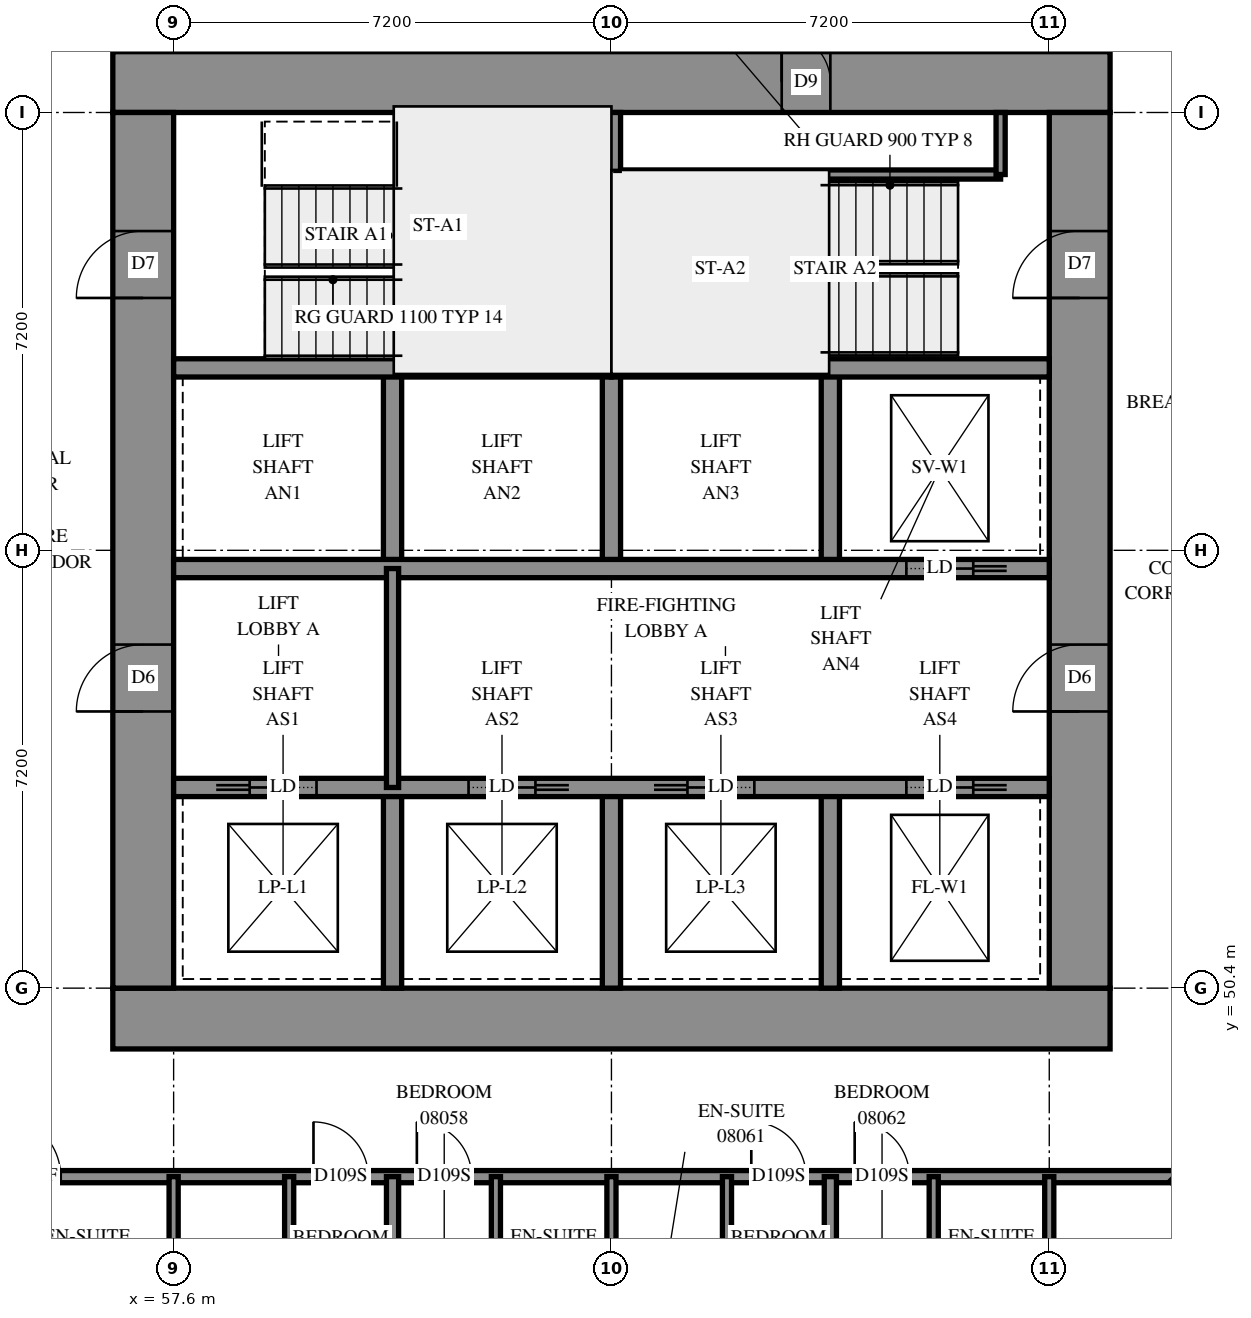
"""IFC4 building model, lengths in metres.
Left out: names, types, materials, properties, quantities, classifications, styles, units other than length and angle.
Written with IfcOpenShell. Run it as: python <this file> out.ifc"""

import sys

from ifc_helpers import new_model, si_unit, direction, frame, frame_2d, origin, place, context, subcontext, project, spatial, rectangle, extrude, element, fill, save


model = new_model("IFC4")
c1 = context("Model", 3, precision=1e-05, world=origin(), true_north=direction((0.0, 1.0)))
c2 = subcontext(c1, "Body", "Model", "MODEL_VIEW")
j1 = project(units=[si_unit("LENGTHUNIT", "METRE"), si_unit("PLANEANGLEUNIT", "RADIAN")], contexts=[c1])
p1 = place(None, origin())
s1 = spatial("IfcSite", under=j1, at=p1, CompositionType="ELEMENT")
p2 = place(p1, origin())
s2 = spatial("IfcBuilding", under=s1, at=p2, CompositionType="ELEMENT")
p3 = place(p2, frame((0.0, 0.0, 33.8)))
s3 = spatial("IfcBuildingStorey", under=s2, at=p3, CompositionType="ELEMENT", Elevation=33.8)
p4 = place(p3, frame((56.6, 49.9, -0.3), z_axis=(0.0, 0.0, 1.0), x_axis=(1.0, 0.0, 0.0)))
e1 = element("IfcWall", 1, at=p4, inside=s3, PredefinedType="SHEAR", context=c2, shape_type="SweptSolid", body=[
    extrude(rectangle(XDim=16.4, YDim=1.0, at=frame_2d((8.2, 0.0))), origin(), (0.0, 0.0, 1.0), 2.7),
])
p5 = place(p3, frame((56.6, 65.3, -0.3), z_axis=(0.0, 0.0, 1.0), x_axis=(1.0, 0.0, 0.0)))
e2 = element("IfcWall", 2, at=p5, inside=s3, PredefinedType="SHEAR", context=c2, shape_type="SweptSolid", body=[
    extrude(rectangle(XDim=16.4, YDim=1.0, at=frame_2d((8.2, 0.0))), origin(), (0.0, 0.0, 1.0), 2.7),
])
p6 = place(p5, frame((11.0, 0.0, 0.3)))
e3 = element("IfcOpeningElement", 3, at=p6, cuts=e2, PredefinedType="OPENING", context=c2, shape_type="SweptSolid", body=[
    extrude(rectangle(XDim=0.8, YDim=2.1, at=frame_2d((0.4, 1.05))), frame((0.0, 0.51, 0.0), z_axis=(0.0, -1.0, 0.0), x_axis=(1.0, 0.0, 0.0)), (0.0, 0.0, 1.0), 1.02),
])
p7 = place(p3, frame((57.1, 50.4, -0.3), z_axis=(0.0, 0.0, 1.0), x_axis=(0.0, 1.0, 0.0)))
e4 = element("IfcWall", 4, at=p7, inside=s3, PredefinedType="SHEAR", context=c2, shape_type="SweptSolid", body=[
    extrude(rectangle(XDim=14.4, YDim=1.0, at=frame_2d((7.2, 0.0))), origin(), (0.0, 0.0, 1.0), 2.7),
])
p8 = place(p7, frame((4.55, 0.0, 0.3)))
e5 = element("IfcOpeningElement", 5, at=p8, cuts=e4, PredefinedType="OPENING", context=c2, shape_type="SweptSolid", body=[
    extrude(rectangle(XDim=1.1, YDim=2.1, at=frame_2d((0.55, 1.05))), frame((0.0, 0.51, 0.0), z_axis=(0.0, -1.0, 0.0), x_axis=(1.0, 0.0, 0.0)), (0.0, 0.0, 1.0), 1.02),
])
p9 = place(p7, frame((11.35, 0.0, 0.3)))
e6 = element("IfcOpeningElement", 6, at=p9, cuts=e4, PredefinedType="OPENING", context=c2, shape_type="SweptSolid", body=[
    extrude(rectangle(XDim=1.1, YDim=2.1, at=frame_2d((0.55, 1.05))), frame((0.0, 0.51, 0.0), z_axis=(0.0, -1.0, 0.0), x_axis=(1.0, 0.0, 0.0)), (0.0, 0.0, 1.0), 1.02),
])
p10 = place(p3, frame((72.5, 50.4, -0.3), z_axis=(0.0, 0.0, 1.0), x_axis=(0.0, 1.0, 0.0)))
e7 = element("IfcWall", 7, at=p10, inside=s3, PredefinedType="SHEAR", context=c2, shape_type="SweptSolid", body=[
    extrude(rectangle(XDim=14.4, YDim=1.0, at=frame_2d((7.2, 0.0))), origin(), (0.0, 0.0, 1.0), 2.7),
])
p11 = place(p10, frame((4.55, 0.0, 0.3)))
e8 = element("IfcOpeningElement", 8, at=p11, cuts=e7, PredefinedType="OPENING", context=c2, shape_type="SweptSolid", body=[
    extrude(rectangle(XDim=1.1, YDim=2.1, at=frame_2d((0.55, 1.05))), frame((0.0, 0.51, 0.0), z_axis=(0.0, -1.0, 0.0), x_axis=(1.0, 0.0, 0.0)), (0.0, 0.0, 1.0), 1.02),
])
p12 = place(p10, frame((11.35, 0.0, 0.3)))
e9 = element("IfcOpeningElement", 9, at=p12, cuts=e7, PredefinedType="OPENING", context=c2, shape_type="SweptSolid", body=[
    extrude(rectangle(XDim=1.1, YDim=2.1, at=frame_2d((0.55, 1.05))), frame((0.0, 0.51, 0.0), z_axis=(0.0, -1.0, 0.0), x_axis=(1.0, 0.0, 0.0)), (0.0, 0.0, 1.0), 1.02),
])
for number, where, z_axis, x_axis in (
    (10, (61.2, 50.4, 0.0), (0.0, 0.0, 1.0), (0.0, 1.0, 0.0)),
    (11, (61.2, 57.3, 0.0), (0.0, 0.0, 1.0), (0.0, 1.0, 0.0)),
    (12, (64.8, 50.4, 0.0), (0.0, 0.0, 1.0), (0.0, 1.0, 0.0)),
    (13, (64.8, 57.3, 0.0), (0.0, 0.0, 1.0), (0.0, 1.0, 0.0)),
    (14, (68.4, 50.4, 0.0), (0.0, 0.0, 1.0), (0.0, 1.0, 0.0)),
    (15, (68.4, 57.3, 0.0), (0.0, 0.0, 1.0), (0.0, 1.0, 0.0)),
):
    element("IfcWall", number, at=place(p3, frame(where, z_axis=z_axis, x_axis=x_axis)), inside=s3, PredefinedType="SOLIDWALL", context=c2, shape_type="SweptSolid", body=[
        extrude(rectangle(XDim=3.3, YDim=0.3, at=frame_2d((1.65, 0.0))), origin(), (0.0, 0.0, 1.0), 3.1),
    ])
p13 = place(p3, frame((57.6, 53.7, 0.0), z_axis=(0.0, 0.0, 1.0), x_axis=(1.0, 0.0, 0.0)))
e16 = element("IfcWall", 16, at=p13, inside=s3, PredefinedType="SOLIDWALL", context=c2, shape_type="SweptSolid", body=[
    extrude(rectangle(XDim=14.4, YDim=0.3, at=frame_2d((7.2, 0.0))), origin(), (0.0, 0.0, 1.0), 3.1),
])
p14 = place(p13, frame((1.25, 0.0, 0.0)))
e17 = element("IfcOpeningElement", 17, at=p14, cuts=e16, PredefinedType="OPENING", context=c2, shape_type="SweptSolid", body=[
    extrude(rectangle(XDim=1.1, YDim=2.1, at=frame_2d((0.55, 1.05))), frame((0.0, 0.16, 0.0), z_axis=(0.0, -1.0, 0.0), x_axis=(1.0, 0.0, 0.0)), (0.0, 0.0, 1.0), 0.32),
])
p15 = place(p13, frame((4.85, 0.0, 0.0)))
e18 = element("IfcOpeningElement", 18, at=p15, cuts=e16, PredefinedType="OPENING", context=c2, shape_type="SweptSolid", body=[
    extrude(rectangle(XDim=1.1, YDim=2.1, at=frame_2d((0.55, 1.05))), frame((0.0, 0.16, 0.0), z_axis=(0.0, -1.0, 0.0), x_axis=(1.0, 0.0, 0.0)), (0.0, 0.0, 1.0), 0.32),
])
p16 = place(p13, frame((8.45, 0.0, 0.0)))
e19 = element("IfcOpeningElement", 19, at=p16, cuts=e16, PredefinedType="OPENING", context=c2, shape_type="SweptSolid", body=[
    extrude(rectangle(XDim=1.1, YDim=2.1, at=frame_2d((0.55, 1.05))), frame((0.0, 0.16, 0.0), z_axis=(0.0, -1.0, 0.0), x_axis=(1.0, 0.0, 0.0)), (0.0, 0.0, 1.0), 0.32),
])
p17 = place(p13, frame((12.05, 0.0, 0.0)))
e20 = element("IfcOpeningElement", 20, at=p17, cuts=e16, PredefinedType="OPENING", context=c2, shape_type="SweptSolid", body=[
    extrude(rectangle(XDim=1.1, YDim=2.1, at=frame_2d((0.55, 1.05))), frame((0.0, 0.16, 0.0), z_axis=(0.0, -1.0, 0.0), x_axis=(1.0, 0.0, 0.0)), (0.0, 0.0, 1.0), 0.32),
])
p18 = place(p3, frame((57.6, 57.3, 0.0), z_axis=(0.0, 0.0, 1.0), x_axis=(1.0, 0.0, 0.0)))
e21 = element("IfcWall", 21, at=p18, inside=s3, PredefinedType="SOLIDWALL", context=c2, shape_type="SweptSolid", body=[
    extrude(rectangle(XDim=14.4, YDim=0.3, at=frame_2d((7.2, 0.0))), origin(), (0.0, 0.0, 1.0), 3.1),
])
p19 = place(p18, frame((12.05, 0.0, 0.0)))
e22 = element("IfcOpeningElement", 22, at=p19, cuts=e21, PredefinedType="OPENING", context=c2, shape_type="SweptSolid", body=[
    extrude(rectangle(XDim=1.1, YDim=2.1, at=frame_2d((0.55, 1.05))), frame((0.0, 0.16, 0.0), z_axis=(0.0, -1.0, 0.0), x_axis=(1.0, 0.0, 0.0)), (0.0, 0.0, 1.0), 0.32),
])
for number, where, z_axis, x_axis in (
    (23, (57.6, 60.6, 0.0), (0.0, 0.0, 1.0), (1.0, 0.0, 0.0)),
    (24, (64.8, 60.6, 0.0), (0.0, 0.0, 1.0), (1.0, 0.0, 0.0)),
):
    element("IfcWall", number, at=place(p3, frame(where, z_axis=z_axis, x_axis=x_axis)), inside=s3, PredefinedType="SOLIDWALL", context=c2, shape_type="SweptSolid", body=[
        extrude(rectangle(XDim=7.2, YDim=0.3, at=frame_2d((3.6, 0.0))), origin(), (0.0, 0.0, 1.0), 3.1),
    ])
p20 = place(p3, frame((64.8, 60.6, 0.0), z_axis=(0.0, 0.0, 1.0), x_axis=(0.0, 1.0, 0.0)))
e25 = element("IfcWall", 25, at=p20, inside=s3, PredefinedType="SOLIDWALL", context=c2, shape_type="SweptSolid", body=[
    extrude(rectangle(XDim=4.2, YDim=0.3, at=frame_2d((2.1, 0.0))), origin(), (0.0, 0.0, 1.0), 3.1),
])
p21 = place(p3, frame((64.95, 63.78, 0.0), z_axis=(0.0, 0.0, 1.0), x_axis=(1.0, 0.0, 0.0)))
e26 = element("IfcWall", 26, at=p21, inside=s3, PredefinedType="PARTITIONING", context=c2, shape_type="SweptSolid", body=[
    extrude(rectangle(XDim=6.25, YDim=0.15, at=frame_2d((3.125, 0.0))), origin(), (0.0, 0.0, 1.0), 3.1),
])
p22 = place(p3, frame((71.2, 63.78, 0.0), z_axis=(0.0, 0.0, 1.0), x_axis=(0.0, 1.0, 0.0)))
e27 = element("IfcWall", 27, at=p22, inside=s3, PredefinedType="PARTITIONING", context=c2, shape_type="SweptSolid", body=[
    extrude(rectangle(XDim=1.02, YDim=0.15, at=frame_2d((0.51, 0.0))), origin(), (0.0, 0.0, 1.0), 3.1),
])
p23 = place(p3, frame((61.2, 53.7, 0.0), z_axis=(0.0, 0.0, 1.0), x_axis=(0.0, 1.0, 0.0)))
e28 = element("IfcWall", 28, at=p23, inside=s3, PredefinedType="PARTITIONING", context=c2, shape_type="SweptSolid", body=[
    extrude(rectangle(XDim=3.6, YDim=0.2, at=frame_2d((1.8, 0.0))), origin(), (0.0, 0.0, 1.0), 3.1),
])
p24 = place(p3, frame((54.5, 47.3, 0.0), z_axis=(0.0, 0.0, 1.0), x_axis=(1.0, 0.0, 0.0)))
e29 = element("IfcWall", 29, at=p24, inside=s3, PredefinedType="PARTITIONING", context=c2, shape_type="SweptSolid", body=[
    extrude(rectangle(XDim=19.56, YDim=0.2, at=frame_2d((9.78, 0.0))), origin(), (0.0, 0.0, 1.0), 3.1),
])
p25 = place(p24, frame((0.243, 0.0, 0.0)))
e30 = element("IfcOpeningElement", 30, at=p25, cuts=e29, PredefinedType="OPENING", context=c2, shape_type="SweptSolid", body=[
    extrude(rectangle(XDim=1.0, YDim=2.1, at=frame_2d((0.5, 1.05))), frame((0.0, 0.11, 0.0), z_axis=(0.0, -1.0, 0.0), x_axis=(1.0, 0.0, 0.0)), (0.0, 0.0, 1.0), 0.22),
])
p26 = place(p24, frame((5.4, 0.0, 0.0)))
e31 = element("IfcOpeningElement", 31, at=p26, cuts=e29, PredefinedType="OPENING", context=c2, shape_type="SweptSolid", body=[
    extrude(rectangle(XDim=0.9, YDim=2.1, at=frame_2d((0.45, 1.05))), frame((0.0, 0.11, 0.0), z_axis=(0.0, -1.0, 0.0), x_axis=(1.0, 0.0, 0.0)), (0.0, 0.0, 1.0), 0.22),
])
p27 = place(p24, frame((7.1, 0.0, 0.0)))
e32 = element("IfcOpeningElement", 32, at=p27, cuts=e29, PredefinedType="OPENING", context=c2, shape_type="SweptSolid", body=[
    extrude(rectangle(XDim=0.9, YDim=2.1, at=frame_2d((0.45, 1.05))), frame((0.0, 0.11, 0.0), z_axis=(0.0, -1.0, 0.0), x_axis=(1.0, 0.0, 0.0)), (0.0, 0.0, 1.0), 0.22),
])
p28 = place(p24, frame((12.6, 0.0, 0.0)))
e33 = element("IfcOpeningElement", 33, at=p28, cuts=e29, PredefinedType="OPENING", context=c2, shape_type="SweptSolid", body=[
    extrude(rectangle(XDim=0.9, YDim=2.1, at=frame_2d((0.45, 1.05))), frame((0.0, 0.11, 0.0), z_axis=(0.0, -1.0, 0.0), x_axis=(1.0, 0.0, 0.0)), (0.0, 0.0, 1.0), 0.22),
])
p29 = place(p24, frame((14.3, 0.0, 0.0)))
e34 = element("IfcOpeningElement", 34, at=p29, cuts=e29, PredefinedType="OPENING", context=c2, shape_type="SweptSolid", body=[
    extrude(rectangle(XDim=0.9, YDim=2.1, at=frame_2d((0.45, 1.05))), frame((0.0, 0.11, 0.0), z_axis=(0.0, -1.0, 0.0), x_axis=(1.0, 0.0, 0.0)), (0.0, 0.0, 1.0), 0.22),
])
p30 = place(p3, frame((68.4, 42.331, 0.0), z_axis=(0.0, 0.0, 1.0), x_axis=(0.0, 1.0, 0.0)))
e35 = element("IfcWall", 35, at=p30, inside=s3, PredefinedType="PARTITIONING", context=c2, shape_type="SweptSolid", body=[
    extrude(rectangle(XDim=4.969, YDim=0.2, at=frame_2d((2.484, 0.0))), origin(), (0.0, 0.0, 1.0), 3.1),
])
p31 = place(p3, frame((61.2, 42.369, 0.0), z_axis=(0.0, 0.0, 1.0), x_axis=(0.0, 1.0, 0.0)))
e36 = element("IfcWall", 36, at=p31, inside=s3, PredefinedType="PARTITIONING", context=c2, shape_type="SweptSolid", body=[
    extrude(rectangle(XDim=4.931, YDim=0.2, at=frame_2d((2.465, 0.0))), origin(), (0.0, 0.0, 1.0), 3.1),
])
p32 = place(p3, frame((74.057, 47.297, 0.0), z_axis=(0.0, 0.0, 1.0), x_axis=(0.7071067812, -0.7071067812, 0.0)))
e37 = element("IfcWall", 37, at=p32, inside=s3, PredefinedType="PARTITIONING", context=c2, shape_type="SweptSolid", body=[
    extrude(rectangle(XDim=4.653, YDim=0.2, at=frame_2d((2.326, 0.0))), origin(), (0.0, 0.0, 1.0), 3.1),
])
p33 = place(p32, frame((0.57, 0.0, 0.0)))
e38 = element("IfcOpeningElement", 38, at=p33, cuts=e37, PredefinedType="OPENING", context=c2, shape_type="SweptSolid", body=[
    extrude(rectangle(XDim=1.0, YDim=2.1, at=frame_2d((0.5, 1.05))), frame((0.0, 0.11, 0.0), z_axis=(0.0, -1.0, 0.0), x_axis=(1.0, 0.0, 0.0)), (0.0, 0.0, 1.0), 0.22),
])
for number, where, z_axis, x_axis in (
    (39, (59.5, 44.9, 0.0), (0.0, 0.0, 1.0), (0.0, 1.0, 0.0)),
    (40, (57.6, 44.9, 0.0), (0.0, 0.0, 1.0), (0.0, 1.0, 0.0)),
    (41, (62.9, 44.9, 0.0), (0.0, 0.0, 1.0), (0.0, 1.0, 0.0)),
    (42, (66.7, 44.9, 0.0), (0.0, 0.0, 1.0), (0.0, 1.0, 0.0)),
    (43, (64.8, 44.9, 0.0), (0.0, 0.0, 1.0), (0.0, 1.0, 0.0)),
    (44, (70.1, 44.9, 0.0), (0.0, 0.0, 1.0), (0.0, 1.0, 0.0)),
    (45, (72.0, 44.9, 0.0), (0.0, 0.0, 1.0), (0.0, 1.0, 0.0)),
):
    element("IfcWall", number, at=place(p3, frame(where, z_axis=z_axis, x_axis=x_axis)), inside=s3, PredefinedType="PARTITIONING", context=c2, shape_type="SweptSolid", body=[
        extrude(rectangle(XDim=2.4, YDim=0.15, at=frame_2d((1.2, 0.0))), origin(), (0.0, 0.0, 1.0), 3.1),
    ])
p34 = place(p6, origin())
e46 = element("IfcDoor", 46, at=p34, inside=s3, OperationType="SINGLE_SWING_RIGHT", PredefinedType="DOOR", context=c2, shape_type="SweptSolid", body=[
    extrude(rectangle(XDim=0.8, YDim=2.1, at=frame_2d((0.4, 1.05))), frame((0.0, -0.44, 0.0), z_axis=(0.0, -1.0, 0.0), x_axis=(1.0, 0.0, 0.0)), (0.0, 0.0, 1.0), 0.05),
])
fill(e3, e46)
p35 = place(p8, origin())
e47 = element("IfcDoor", 47, at=p35, inside=s3, OperationType="DOUBLE_DOOR_SINGLE_SWING", PredefinedType="DOOR", context=c2, shape_type="SweptSolid", body=[
    extrude(rectangle(XDim=1.1, YDim=2.1, at=frame_2d((0.55, 1.05))), frame((0.0, 0.025, 0.0), z_axis=(0.0, -1.0, 0.0), x_axis=(1.0, 0.0, 0.0)), (0.0, 0.0, 1.0), 0.05),
])
fill(e5, e47)
p36 = place(p11, origin())
e48 = element("IfcDoor", 48, at=p36, inside=s3, OperationType="DOUBLE_DOOR_SINGLE_SWING", PredefinedType="DOOR", context=c2, shape_type="SweptSolid", body=[
    extrude(rectangle(XDim=1.1, YDim=2.1, at=frame_2d((0.55, 1.05))), frame((0.0, 0.025, 0.0), z_axis=(0.0, -1.0, 0.0), x_axis=(1.0, 0.0, 0.0)), (0.0, 0.0, 1.0), 0.05),
])
fill(e8, e48)
p37 = place(p9, origin())
e49 = element("IfcDoor", 49, at=p37, inside=s3, OperationType="SINGLE_SWING_LEFT", PredefinedType="DOOR", context=c2, shape_type="SweptSolid", body=[
    extrude(rectangle(XDim=1.1, YDim=2.1, at=frame_2d((0.55, 1.05))), frame((0.0, 0.025, 0.0), z_axis=(0.0, -1.0, 0.0), x_axis=(1.0, 0.0, 0.0)), (0.0, 0.0, 1.0), 0.05),
])
fill(e6, e49)
p38 = place(p12, origin())
e50 = element("IfcDoor", 50, at=p38, inside=s3, OperationType="SINGLE_SWING_RIGHT", PredefinedType="DOOR", context=c2, shape_type="SweptSolid", body=[
    extrude(rectangle(XDim=1.1, YDim=2.1, at=frame_2d((0.55, 1.05))), frame((0.0, 0.025, 0.0), z_axis=(0.0, -1.0, 0.0), x_axis=(1.0, 0.0, 0.0)), (0.0, 0.0, 1.0), 0.05),
])
fill(e9, e50)
p39 = place(p14, origin())
e51 = element("IfcDoor", 51, at=p39, inside=s3, OperationType="SLIDING_TO_LEFT", PredefinedType="DOOR", context=c2, shape_type="SweptSolid", body=[
    extrude(rectangle(XDim=1.1, YDim=2.1, at=frame_2d((0.55, 1.05))), frame((0.0, 0.025, 0.0), z_axis=(0.0, -1.0, 0.0), x_axis=(1.0, 0.0, 0.0)), (0.0, 0.0, 1.0), 0.05),
])
fill(e17, e51)
p40 = place(p15, origin())
e52 = element("IfcDoor", 52, at=p40, inside=s3, OperationType="SLIDING_TO_RIGHT", PredefinedType="DOOR", context=c2, shape_type="SweptSolid", body=[
    extrude(rectangle(XDim=1.1, YDim=2.1, at=frame_2d((0.55, 1.05))), frame((0.0, 0.025, 0.0), z_axis=(0.0, -1.0, 0.0), x_axis=(1.0, 0.0, 0.0)), (0.0, 0.0, 1.0), 0.05),
])
fill(e18, e52)
p41 = place(p16, origin())
e53 = element("IfcDoor", 53, at=p41, inside=s3, OperationType="SLIDING_TO_LEFT", PredefinedType="DOOR", context=c2, shape_type="SweptSolid", body=[
    extrude(rectangle(XDim=1.1, YDim=2.1, at=frame_2d((0.55, 1.05))), frame((0.0, 0.025, 0.0), z_axis=(0.0, -1.0, 0.0), x_axis=(1.0, 0.0, 0.0)), (0.0, 0.0, 1.0), 0.05),
])
fill(e19, e53)
p42 = place(p17, origin())
e54 = element("IfcDoor", 54, at=p42, inside=s3, OperationType="SLIDING_TO_RIGHT", PredefinedType="DOOR", context=c2, shape_type="SweptSolid", body=[
    extrude(rectangle(XDim=1.1, YDim=2.1, at=frame_2d((0.55, 1.05))), frame((0.0, 0.025, 0.0), z_axis=(0.0, -1.0, 0.0), x_axis=(1.0, 0.0, 0.0)), (0.0, 0.0, 1.0), 0.05),
])
fill(e20, e54)
p43 = place(p19, origin())
e55 = element("IfcDoor", 55, at=p43, inside=s3, OperationType="SLIDING_TO_RIGHT", PredefinedType="DOOR", context=c2, shape_type="SweptSolid", body=[
    extrude(rectangle(XDim=1.1, YDim=2.1, at=frame_2d((0.55, 1.05))), frame((0.0, 0.025, 0.0), z_axis=(0.0, -1.0, 0.0), x_axis=(1.0, 0.0, 0.0)), (0.0, 0.0, 1.0), 0.05),
])
fill(e22, e55)
p44 = place(p25, origin())
e56 = element("IfcDoor", 56, at=p44, inside=s3, OperationType="SINGLE_SWING_RIGHT", PredefinedType="DOOR", context=c2, shape_type="SweptSolid", body=[
    extrude(rectangle(XDim=1.0, YDim=2.1, at=frame_2d((0.5, 1.05))), frame((0.0, 0.025, 0.0), z_axis=(0.0, -1.0, 0.0), x_axis=(1.0, 0.0, 0.0)), (0.0, 0.0, 1.0), 0.05),
])
fill(e30, e56)
p45 = place(p26, origin())
e57 = element("IfcDoor", 57, at=p45, inside=s3, OperationType="SINGLE_SWING_LEFT", PredefinedType="DOOR", context=c2, shape_type="SweptSolid", body=[
    extrude(rectangle(XDim=0.9, YDim=2.1, at=frame_2d((0.45, 1.05))), frame((0.0, 0.025, 0.0), z_axis=(0.0, -1.0, 0.0), x_axis=(1.0, 0.0, 0.0)), (0.0, 0.0, 1.0), 0.05),
])
fill(e31, e57)
p46 = place(p27, origin())
e58 = element("IfcDoor", 58, at=p46, inside=s3, OperationType="SINGLE_SWING_RIGHT", PredefinedType="DOOR", context=c2, shape_type="SweptSolid", body=[
    extrude(rectangle(XDim=0.9, YDim=2.1, at=frame_2d((0.45, 1.05))), frame((0.0, 0.025, 0.0), z_axis=(0.0, -1.0, 0.0), x_axis=(1.0, 0.0, 0.0)), (0.0, 0.0, 1.0), 0.05),
])
fill(e32, e58)
p47 = place(p28, origin())
e59 = element("IfcDoor", 59, at=p47, inside=s3, OperationType="SINGLE_SWING_LEFT", PredefinedType="DOOR", context=c2, shape_type="SweptSolid", body=[
    extrude(rectangle(XDim=0.9, YDim=2.1, at=frame_2d((0.45, 1.05))), frame((0.0, 0.025, 0.0), z_axis=(0.0, -1.0, 0.0), x_axis=(1.0, 0.0, 0.0)), (0.0, 0.0, 1.0), 0.05),
])
fill(e33, e59)
p48 = place(p29, origin())
e60 = element("IfcDoor", 60, at=p48, inside=s3, OperationType="SINGLE_SWING_RIGHT", PredefinedType="DOOR", context=c2, shape_type="SweptSolid", body=[
    extrude(rectangle(XDim=0.9, YDim=2.1, at=frame_2d((0.45, 1.05))), frame((0.0, 0.025, 0.0), z_axis=(0.0, -1.0, 0.0), x_axis=(1.0, 0.0, 0.0)), (0.0, 0.0, 1.0), 0.05),
])
fill(e34, e60)
save(model, sys.argv[1])
